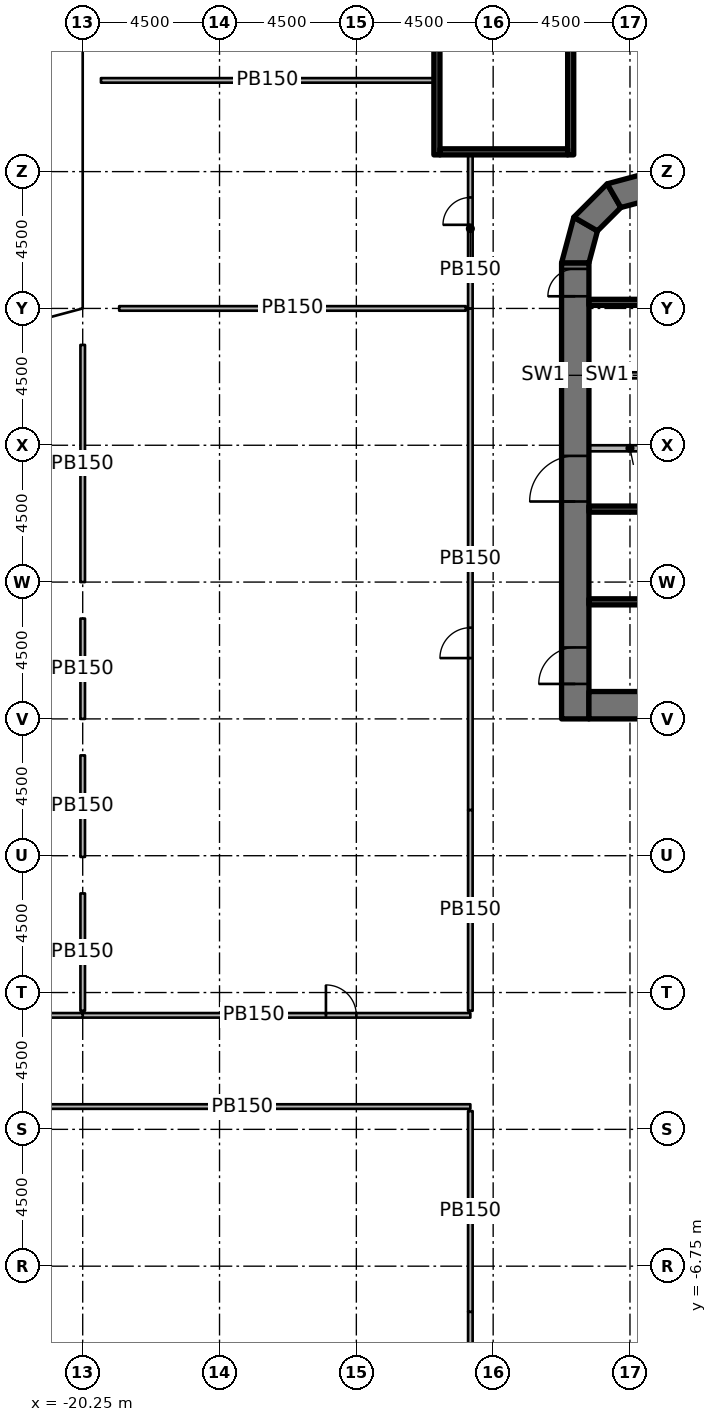
"""IFC4 building model, lengths in metres.
Left out: names, types, materials, properties, quantities, classifications, styles, units other than length and angle.
Written with IfcOpenShell. Run it as: python <this file> out.ifc"""

import sys

from ifc_helpers import new_model, si_unit, direction, frame, frame_2d, origin, origin_2d, place, context, subcontext, project, spatial, polyline, rectangle, outline, extrude, element, fill, save


model = new_model("IFC4")
c1 = context("Model", 3, precision=1e-05, world=origin(), true_north=direction((0.0, 1.0)))
c2 = subcontext(c1, "Body", "Model", "MODEL_VIEW")
j1 = project(units=[si_unit("LENGTHUNIT", "METRE"), si_unit("PLANEANGLEUNIT", "RADIAN")], contexts=[c1])
p1 = place(None, origin())
s1 = spatial("IfcSite", under=j1, at=p1, CompositionType="ELEMENT")
p2 = place(p1, origin())
s2 = spatial("IfcBuilding", under=s1, at=p2, CompositionType="ELEMENT")
p3 = place(p2, frame((0.0, 0.0, 12.0)))
s3 = spatial("IfcBuildingStorey", under=s2, at=p3, CompositionType="ELEMENT", Elevation=12.0)
for number, where, z_axis, x_axis in (
    (1, (-20.25, -6.11, 0.0), (0.0, 0.0, 1.0), (1.0, 0.0, 0.0)),
    (2, (-20.25, 6.11, 0.0), (0.0, 0.0, 1.0), (1.0, 0.0, 0.0)),
    (3, (-20.25, 10.65, 0.0), (0.0, 0.0, 1.0), (1.0, 0.0, 0.0)),
    (4, (-19.65, 15.15, 0.0), (0.0, 0.0, 1.0), (1.0, 0.0, 0.0)),
    (5, (-19.65, 24.15, 0.0), (0.0, 0.0, 1.0), (1.0, 0.0, 0.0)),
    (6, (-15.75, -6.25, 0.0), (0.0, 0.0, 1.0), (1.0, 0.0, 0.0)),
    (7, (-15.75, 6.25, 0.0), (0.0, 0.0, 1.0), (1.0, 0.0, 0.0)),
    (8, (-15.15, 10.65, 0.0), (0.0, 0.0, 1.0), (1.0, 0.0, 0.0)),
    (9, (-15.15, 19.65, 0.0), (0.0, 0.0, 1.0), (1.0, 0.0, 0.0)),
    (10, (-15.15, 33.75, 0.0), (0.0, 0.0, 1.0), (1.0, 0.0, 0.0)),
    (11, (-10.75, -6.25, 0.0), (0.0, 0.0, 1.0), (1.0, 0.0, 0.0)),
    (12, (-10.75, 6.25, 0.0), (0.0, 0.0, 1.0), (1.0, 0.0, 0.0)),
    (13, (-10.65, 15.15, 0.0), (0.0, 0.0, 1.0), (1.0, 0.0, 0.0)),
    (14, (-10.65, 29.25, 0.0), (0.0, 0.0, 1.0), (1.0, 0.0, 0.0)),
    (15, (-6.25, -6.25, 0.0), (0.0, 0.0, 1.0), (1.0, 0.0, 0.0)),
    (16, (-6.25, 6.25, 0.0), (0.0, 0.0, 1.0), (1.0, 0.0, 0.0)),
    (17, (-6.25, 10.75, 0.0), (0.0, 0.0, 1.0), (1.0, 0.0, 0.0)),
    (18, (-6.25, 15.75, 0.0), (0.0, 0.0, 1.0), (1.0, 0.0, 0.0)),
    (19, (-6.25, 20.25, 0.0), (0.0, 0.0, 1.0), (1.0, 0.0, 0.0)),
    (20, (-6.25, 24.65, 0.0), (0.0, 0.0, 1.0), (1.0, 0.0, 0.0)),
    (21, (-6.25, 26.7, 0.0), (0.0, 0.0, 1.0), (1.0, 0.0, 0.0)),
    (22, (-2.25, 33.11, 0.0), (0.0, 0.0, 1.0), (1.0, 0.0, 0.0)),
):
    element("IfcColumn", number, at=place(p3, frame(where, z_axis=z_axis, x_axis=x_axis)), inside=s3, PredefinedType="COLUMN", context=c2, shape_type="SweptSolid", body=[
        extrude(rectangle(XDim=1.2, YDim=1.2, at=origin_2d()), origin(), (0.0, 0.0, 1.0), 4.55),
    ])
p4 = place(p3, frame((-4.05, 11.25, 0.0), z_axis=(0.0, 0.0, 1.0), x_axis=(0.0, 1.0, 0.0)))
e23 = element("IfcWall", 23, at=p4, inside=s3, PredefinedType="SHEAR", context=c2, shape_type="SweptSolid", body=[
    extrude(rectangle(XDim=15.0, YDim=0.9, at=frame_2d((7.5, 0.0))), origin(), (0.0, 0.0, 1.0), 5.0),
])
p5 = place(p4, frame((7.15, 0.0, 0.0)))
e24 = element("IfcOpeningElement", 24, at=p5, cuts=e23, PredefinedType="OPENING", context=c2, shape_type="SweptSolid", body=[
    extrude(rectangle(XDim=1.5, YDim=2.3, at=frame_2d((0.75, 1.15))), frame((0.0, 0.46, 0.0), z_axis=(0.0, -1.0, 0.0), x_axis=(1.0, 0.0, 0.0)), (0.0, 0.0, 1.0), 0.92),
])
p6 = place(p4, frame((13.9, 0.0, 0.0)))
e25 = element("IfcOpeningElement", 25, at=p6, cuts=e23, PredefinedType="OPENING", context=c2, shape_type="SweptSolid", body=[
    extrude(rectangle(XDim=0.9, YDim=2.1, at=frame_2d((0.45, 1.05))), frame((0.0, 0.46, 0.0), z_axis=(0.0, -1.0, 0.0), x_axis=(1.0, 0.0, 0.0)), (0.0, 0.0, 1.0), 0.92),
])
p7 = place(p4, frame((1.15, 0.0, 0.0)))
e26 = element("IfcOpeningElement", 26, at=p7, cuts=e23, PredefinedType="OPENING", context=c2, shape_type="SweptSolid", body=[
    extrude(rectangle(XDim=1.2, YDim=2.1, at=frame_2d((0.6, 1.05))), frame((0.0, 0.46, 0.0), z_axis=(0.0, -1.0, 0.0), x_axis=(1.0, 0.0, 0.0)), (0.0, 0.0, 1.0), 0.92),
])
p8 = place(p3, frame((-3.6, 11.7, 0.0), z_axis=(0.0, 0.0, 1.0), x_axis=(1.0, 0.0, 0.0)))
e27 = element("IfcWall", 27, at=p8, inside=s3, PredefinedType="SHEAR", context=c2, shape_type="SweptSolid", body=[
    extrude(rectangle(XDim=7.2, YDim=0.9, at=frame_2d((3.6, 0.0))), origin(), (0.0, 0.0, 1.0), 5.0),
])
p9 = place(p3, origin())
e28 = element("IfcWall", 28, at=p9, inside=s3, PredefinedType="SHEAR", context=c2, shape_type="SweptSolid", body=[
    extrude(outline(polyline([(-4.5, 26.25), (-4.098, 27.75), (-3.319, 27.3), (-3.6, 26.25), (-4.5, 26.25)])), origin(), (0.0, 0.0, 1.0), 5.0),
])
p10 = place(p3, origin())
e29 = element("IfcWall", 29, at=p10, inside=s3, PredefinedType="SHEAR", context=c2, shape_type="SweptSolid", body=[
    extrude(outline(polyline([(-4.098, 27.75), (-3.0, 28.848), (-2.55, 28.069), (-3.319, 27.3), (-4.098, 27.75)])), origin(), (0.0, 0.0, 1.0), 5.0),
])
p11 = place(p3, origin())
e30 = element("IfcWall", 30, at=p11, inside=s3, PredefinedType="SHEAR", context=c2, shape_type="SweptSolid", body=[
    extrude(outline(polyline([(-3.0, 28.848), (-1.5, 29.25), (-1.5, 28.35), (-2.55, 28.069), (-3.0, 28.848)])), origin(), (0.0, 0.0, 1.0), 5.0),
])
for number, where, z_axis, x_axis in (
    (31, (-3.6, 24.95, 0.0), (0.0, 0.0, 1.0), (1.0, 0.0, 0.0)),
    (32, (-3.6, 18.15, 0.0), (0.0, 0.0, 1.0), (1.0, 0.0, 0.0)),
    (33, (-3.6, 15.1, 0.0), (0.0, 0.0, 1.0), (1.0, 0.0, 0.0)),
):
    element("IfcWall", number, at=place(p3, frame(where, z_axis=z_axis, x_axis=x_axis)), inside=s3, PredefinedType="SHEAR", context=c2, shape_type="SweptSolid", body=[
        extrude(rectangle(XDim=7.2, YDim=0.2, at=frame_2d((3.6, 0.0))), origin(), (0.0, 0.0, 1.0), 4.55),
    ])
p12 = place(p3, frame((-3.6, 20.15, 0.0), z_axis=(0.0, 0.0, 1.0), x_axis=(1.0, 0.0, 0.0)))
e34 = element("IfcWall", 34, at=p12, inside=s3, PredefinedType="PARTITIONING", context=c2, shape_type="SweptSolid", body=[
    extrude(rectangle(XDim=2.7, YDim=0.2, at=frame_2d((1.35, 0.0))), origin(), (0.0, 0.0, 1.0), 4.55),
])
p13 = place(p3, frame((-3.6, 22.55, 0.0), z_axis=(0.0, 0.0, 1.0), x_axis=(1.0, 0.0, 0.0)))
e35 = element("IfcWall", 35, at=p13, inside=s3, PredefinedType="PARTITIONING", context=c2, shape_type="SweptSolid", body=[
    extrude(rectangle(XDim=2.5, YDim=0.2, at=frame_2d((1.25, 0.0))), origin(), (0.0, 0.0, 1.0), 4.55),
])
p14 = place(p3, frame((-8.6, 29.8, 0.0), z_axis=(0.0, 0.0, 1.0), x_axis=(0.0, 1.0, 0.0)))
e36 = element("IfcWall", 36, at=p14, inside=s3, PredefinedType="SHEAR", context=c2, shape_type="SweptSolid", body=[
    extrude(rectangle(XDim=8.0, YDim=0.2, at=frame_2d((4.0, 0.0))), origin(), (0.0, 0.0, 1.0), 4.55),
])
p15 = place(p3, frame((-4.2, 29.8, 0.0), z_axis=(0.0, 0.0, 1.0), x_axis=(0.0, 1.0, 0.0)))
e37 = element("IfcWall", 37, at=p15, inside=s3, PredefinedType="SHEAR", context=c2, shape_type="SweptSolid", body=[
    extrude(rectangle(XDim=8.0, YDim=0.2, at=frame_2d((4.0, 0.0))), origin(), (0.0, 0.0, 1.0), 4.55),
])
p16 = place(p15, frame((6.3, 0.0, 0.0)))
e38 = element("IfcOpeningElement", 38, at=p16, cuts=e37, PredefinedType="OPENING", context=c2, shape_type="SweptSolid", body=[
    extrude(rectangle(XDim=1.2, YDim=2.1, at=frame_2d((0.6, 1.05))), frame((0.0, 0.11, 0.0), z_axis=(0.0, -1.0, 0.0), x_axis=(1.0, 0.0, 0.0)), (0.0, 0.0, 1.0), 0.22),
])
p17 = place(p3, frame((-8.5, 29.9, 0.0), z_axis=(0.0, 0.0, 1.0), x_axis=(1.0, 0.0, 0.0)))
e39 = element("IfcWall", 39, at=p17, inside=s3, PredefinedType="SHEAR", context=c2, shape_type="SweptSolid", body=[
    extrude(rectangle(XDim=4.2, YDim=0.2, at=frame_2d((2.1, 0.0))), origin(), (0.0, 0.0, 1.0), 4.55),
])
p18 = place(p3, frame((-7.5, 8.25, 0.0), z_axis=(0.0, 0.0, 1.0), x_axis=(0.0, 1.0, 0.0)))
e40 = element("IfcWall", 40, at=p18, inside=s3, PredefinedType="PARTITIONING", context=c2, shape_type="SweptSolid", body=[
    extrude(rectangle(XDim=16.5, YDim=0.15, at=frame_2d((8.25, 0.0))), origin(), (0.0, 0.0, 1.0), 4.55),
])
p19 = place(p18, frame((5.0, 0.0, 0.0)))
e41 = element("IfcOpeningElement", 41, at=p19, cuts=e40, PredefinedType="OPENING", context=c2, shape_type="SweptSolid", body=[
    extrude(rectangle(XDim=1.0, YDim=2.1, at=frame_2d((0.5, 1.05))), frame((0.0, 0.085, 0.0), z_axis=(0.0, -1.0, 0.0), x_axis=(1.0, 0.0, 0.0)), (0.0, 0.0, 1.0), 0.17),
])
p20 = place(p3, frame((-7.5, 24.75, 0.0), z_axis=(0.0, 0.0, 1.0), x_axis=(0.0, 1.0, 0.0)))
e42 = element("IfcWall", 42, at=p20, inside=s3, PredefinedType="PARTITIONING", context=c2, shape_type="SweptSolid", body=[
    extrude(rectangle(XDim=5.25, YDim=0.15, at=frame_2d((2.625, 0.0))), origin(), (0.0, 0.0, 1.0), 4.55),
])
p21 = place(p20, frame((2.75, 0.0, 0.0)))
e43 = element("IfcOpeningElement", 43, at=p21, cuts=e42, PredefinedType="OPENING", context=c2, shape_type="SweptSolid", body=[
    extrude(rectangle(XDim=0.9, YDim=2.1, at=frame_2d((0.45, 1.05))), frame((0.0, 0.085, 0.0), z_axis=(0.0, -1.0, 0.0), x_axis=(1.0, 0.0, 0.0)), (0.0, 0.0, 1.0), 0.17),
])
p22 = place(p3, frame((-7.5, -24.75, 0.0), z_axis=(0.0, 0.0, 1.0), x_axis=(0.0, 1.0, 0.0)))
e44 = element("IfcWall", 44, at=p22, inside=s3, PredefinedType="PARTITIONING", context=c2, shape_type="SweptSolid", body=[
    extrude(rectangle(XDim=16.5, YDim=0.15, at=frame_2d((8.25, 0.0))), origin(), (0.0, 0.0, 1.0), 4.55),
])
p23 = place(p22, frame((7.25, 0.0, 0.0)))
e45 = element("IfcOpeningElement", 45, at=p23, cuts=e44, PredefinedType="OPENING", context=c2, shape_type="SweptSolid", body=[
    extrude(rectangle(XDim=1.0, YDim=2.1, at=frame_2d((0.5, 1.05))), frame((0.0, 0.085, 0.0), z_axis=(0.0, -1.0, 0.0), x_axis=(1.0, 0.0, 0.0)), (0.0, 0.0, 1.0), 0.17),
])
p24 = place(p3, frame((-20.25, 1.5, 0.0), z_axis=(0.0, 0.0, 1.0), x_axis=(1.0, 0.0, 0.0)))
e46 = element("IfcWall", 46, at=p24, inside=s3, PredefinedType="PARTITIONING", context=c2, shape_type="SweptSolid", body=[
    extrude(rectangle(XDim=12.75, YDim=0.15, at=frame_2d((6.375, 0.0))), origin(), (0.0, 0.0, 1.0), 4.55),
])
p25 = place(p24, frame((8.0, 0.0, 0.0)))
e47 = element("IfcOpeningElement", 47, at=p25, cuts=e46, PredefinedType="OPENING", context=c2, shape_type="SweptSolid", body=[
    extrude(rectangle(XDim=1.0, YDim=2.1, at=frame_2d((0.5, 1.05))), frame((0.0, 0.085, 0.0), z_axis=(0.0, -1.0, 0.0), x_axis=(1.0, 0.0, 0.0)), (0.0, 0.0, 1.0), 0.17),
])
p26 = place(p3, frame((-46.65, 1.5, 0.0), z_axis=(0.0, 0.0, 1.0), x_axis=(1.0, 0.0, 0.0)))
e48 = element("IfcWall", 48, at=p26, inside=s3, PredefinedType="PARTITIONING", context=c2, shape_type="SweptSolid", body=[
    extrude(rectangle(XDim=26.4, YDim=0.15, at=frame_2d((13.2, 0.0))), origin(), (0.0, 0.0, 1.0), 4.55),
])
p27 = place(p26, frame((11.9, 0.0, 0.0)))
e49 = element("IfcOpeningElement", 49, at=p27, cuts=e48, PredefinedType="OPENING", context=c2, shape_type="SweptSolid", body=[
    extrude(rectangle(XDim=0.9, YDim=2.1, at=frame_2d((0.45, 1.05))), frame((0.0, 0.085, 0.0), z_axis=(0.0, -1.0, 0.0), x_axis=(1.0, 0.0, 0.0)), (0.0, 0.0, 1.0), 0.17),
])
p28 = place(p3, frame((-7.5, -1.5, 0.0), z_axis=(0.0, 0.0, 1.0), x_axis=(-1.0, 0.0, 0.0)))
e50 = element("IfcWall", 50, at=p28, inside=s3, PredefinedType="PARTITIONING", context=c2, shape_type="SweptSolid", body=[
    extrude(rectangle(XDim=15.0, YDim=0.15, at=frame_2d((7.5, 0.0))), origin(), (0.0, 0.0, 1.0), 4.55),
])
p29 = place(p3, frame((-20.25, 1.65, 0.0), z_axis=(0.0, 0.0, 1.0), x_axis=(0.0, 1.0, 0.0)))
e51 = element("IfcWall", 51, at=p29, inside=s3, PredefinedType="PARTITIONING", context=c2, shape_type="SweptSolid", body=[
    extrude(rectangle(XDim=3.86, YDim=0.15, at=frame_2d((1.93, 0.0))), origin(), (0.0, 0.0, 1.0), 4.55),
])
p30 = place(p3, frame((-20.25, 6.71, 0.0), z_axis=(0.0, 0.0, 1.0), x_axis=(0.0, 1.0, 0.0)))
e52 = element("IfcWall", 52, at=p30, inside=s3, PredefinedType="PARTITIONING", context=c2, shape_type="SweptSolid", body=[
    extrude(rectangle(XDim=3.34, YDim=0.15, at=frame_2d((1.67, 0.0))), origin(), (0.0, 0.0, 1.0), 4.55),
])
p31 = place(p3, frame((-20.25, 11.25, 0.0), z_axis=(0.0, 0.0, 1.0), x_axis=(0.0, 1.0, 0.0)))
e53 = element("IfcWall", 53, at=p31, inside=s3, PredefinedType="PARTITIONING", context=c2, shape_type="SweptSolid", body=[
    extrude(rectangle(XDim=3.3, YDim=0.15, at=frame_2d((1.65, 0.0))), origin(), (0.0, 0.0, 1.0), 4.55),
])
p32 = place(p3, frame((-20.25, 15.75, 0.0), z_axis=(0.0, 0.0, 1.0), x_axis=(0.0, 1.0, 0.0)))
e54 = element("IfcWall", 54, at=p32, inside=s3, PredefinedType="PARTITIONING", context=c2, shape_type="SweptSolid", body=[
    extrude(rectangle(XDim=7.8, YDim=0.15, at=frame_2d((3.9, 0.0))), origin(), (0.0, 0.0, 1.0), 4.55),
])
p33 = place(p3, frame((-19.05, 24.75, 0.0), z_axis=(0.0, 0.0, 1.0), x_axis=(1.0, 0.0, 0.0)))
e55 = element("IfcWall", 55, at=p33, inside=s3, PredefinedType="PARTITIONING", context=c2, shape_type="SweptSolid", body=[
    extrude(rectangle(XDim=11.4, YDim=0.15, at=frame_2d((5.7, 0.0))), origin(), (0.0, 0.0, 1.0), 4.55),
])
p34 = place(p3, frame((-7.5, 8.25, 0.0), z_axis=(0.0, 0.0, 1.0), x_axis=(0.0, -1.0, 0.0)))
e56 = element("IfcWall", 56, at=p34, inside=s3, PredefinedType="PARTITIONING", context=c2, shape_type="SweptSolid", body=[
    extrude(rectangle(XDim=6.6, YDim=0.15, at=frame_2d((3.3, 0.0))), origin(), (0.0, 0.0, 1.0), 4.55),
])
p35 = place(p3, frame((-19.65, 32.25, 0.0), z_axis=(0.0, 0.0, 1.0), x_axis=(1.0, 0.0, 0.0)))
e57 = element("IfcWall", 57, at=p35, inside=s3, PredefinedType="PARTITIONING", context=c2, shape_type="SweptSolid", body=[
    extrude(rectangle(XDim=10.95, YDim=0.15, at=frame_2d((5.475, 0.0))), origin(), (0.0, 0.0, 1.0), 4.55),
])
p36 = place(p3, frame((-7.5, -1.65, 0.0), z_axis=(0.0, 0.0, 1.0), x_axis=(0.0, -1.0, 0.0)))
e58 = element("IfcWall", 58, at=p36, inside=s3, PredefinedType="PARTITIONING", context=c2, shape_type="SweptSolid", body=[
    extrude(rectangle(XDim=6.6, YDim=0.15, at=frame_2d((3.3, 0.0))), origin(), (0.0, 0.0, 1.0), 4.55),
])
p37 = place(p5, origin())
e59 = element("IfcDoor", 59, at=p37, inside=s3, OperationType="DOUBLE_DOOR_SINGLE_SWING", PredefinedType="DOOR", context=c2, shape_type="SweptSolid", body=[
    extrude(rectangle(XDim=1.5, YDim=2.3, at=frame_2d((0.75, 1.15))), frame((0.0, 0.025, 0.0), z_axis=(0.0, -1.0, 0.0), x_axis=(1.0, 0.0, 0.0)), (0.0, 0.0, 1.0), 0.05),
])
fill(e24, e59)
p38 = place(p6, origin())
e60 = element("IfcDoor", 60, at=p38, inside=s3, OperationType="SINGLE_SWING_RIGHT", PredefinedType="DOOR", context=c2, shape_type="SweptSolid", body=[
    extrude(rectangle(XDim=0.9, YDim=2.1, at=frame_2d((0.45, 1.05))), frame((0.0, 0.025, 0.0), z_axis=(0.0, -1.0, 0.0), x_axis=(1.0, 0.0, 0.0)), (0.0, 0.0, 1.0), 0.05),
])
fill(e25, e60)
p39 = place(p7, origin())
e61 = element("IfcDoor", 61, at=p39, inside=s3, OperationType="SINGLE_SWING_RIGHT", PredefinedType="DOOR", context=c2, shape_type="SweptSolid", body=[
    extrude(rectangle(XDim=1.2, YDim=2.1, at=frame_2d((0.6, 1.05))), frame((0.0, 0.025, 0.0), z_axis=(0.0, -1.0, 0.0), x_axis=(1.0, 0.0, 0.0)), (0.0, 0.0, 1.0), 0.05),
])
fill(e26, e61)
p40 = place(p19, origin())
e62 = element("IfcDoor", 62, at=p40, inside=s3, OperationType="SINGLE_SWING_LEFT", PredefinedType="DOOR", context=c2, shape_type="SweptSolid", body=[
    extrude(rectangle(XDim=1.0, YDim=2.1, at=frame_2d((0.5, 1.05))), frame((0.0, 0.025, 0.0), z_axis=(0.0, -1.0, 0.0), x_axis=(1.0, 0.0, 0.0)), (0.0, 0.0, 1.0), 0.05),
])
fill(e41, e62)
p41 = place(p21, origin())
e63 = element("IfcDoor", 63, at=p41, inside=s3, OperationType="SINGLE_SWING_LEFT", PredefinedType="DOOR", context=c2, shape_type="SweptSolid", body=[
    extrude(rectangle(XDim=0.9, YDim=2.1, at=frame_2d((0.45, 1.05))), frame((0.0, 0.025, 0.0), z_axis=(0.0, -1.0, 0.0), x_axis=(1.0, 0.0, 0.0)), (0.0, 0.0, 1.0), 0.05),
])
fill(e43, e63)
p42 = place(p25, origin())
e64 = element("IfcDoor", 64, at=p42, inside=s3, OperationType="SINGLE_SWING_LEFT", PredefinedType="DOOR", context=c2, shape_type="SweptSolid", body=[
    extrude(rectangle(XDim=1.0, YDim=2.1, at=frame_2d((0.5, 1.05))), frame((0.0, 0.025, 0.0), z_axis=(0.0, -1.0, 0.0), x_axis=(1.0, 0.0, 0.0)), (0.0, 0.0, 1.0), 0.05),
])
fill(e47, e64)
save(model, sys.argv[1])
